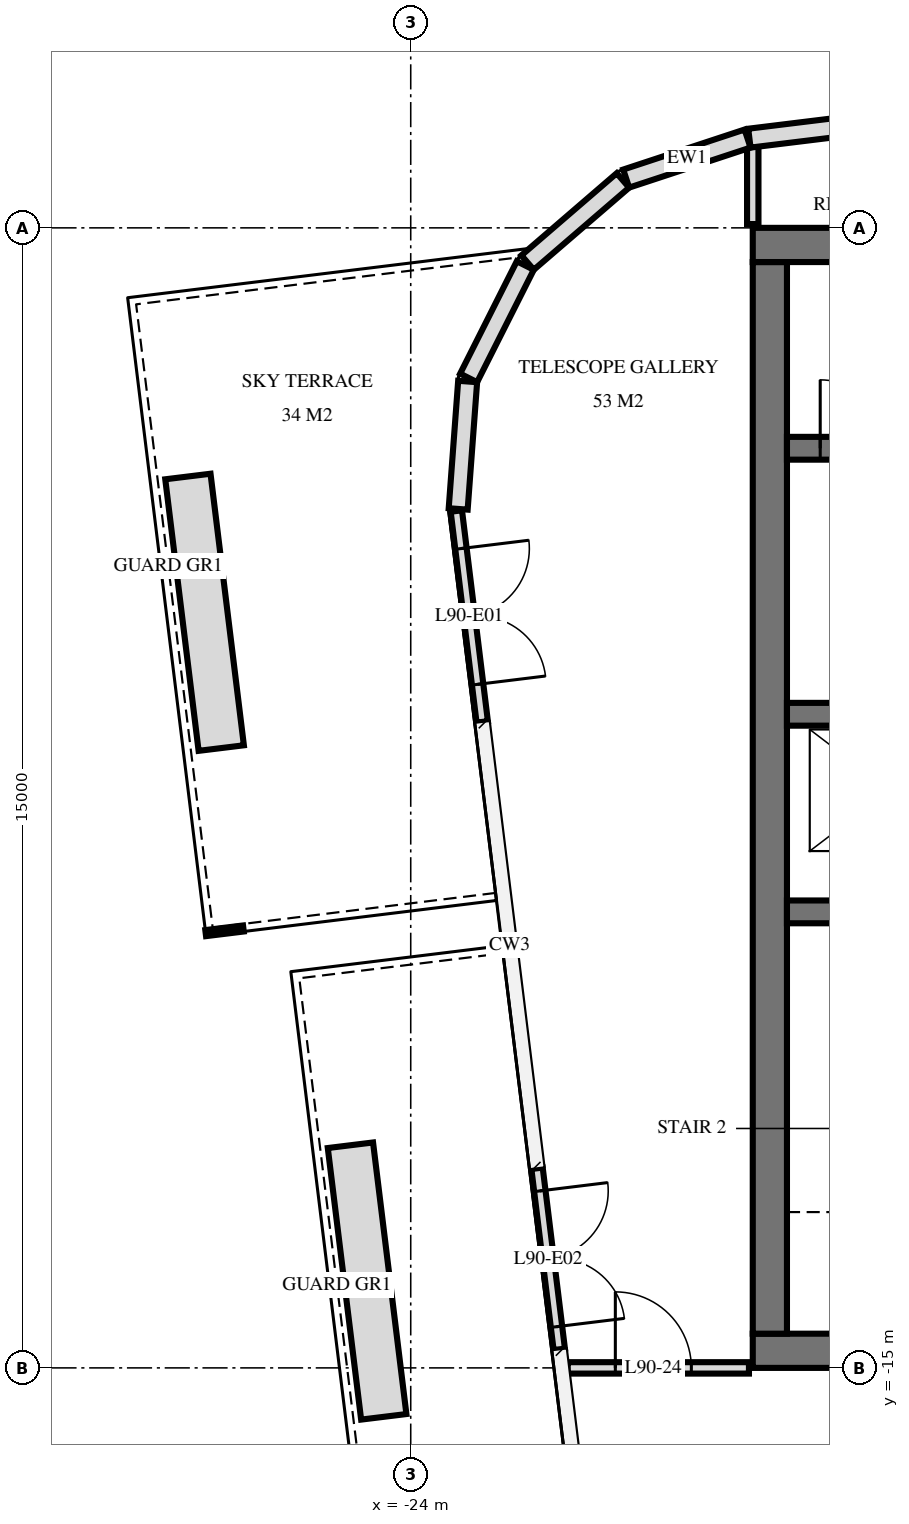
"""IFC4 building model, lengths in metres.
Left out: names, types, materials, properties, quantities, classifications, styles, units other than length and angle.
Written with IfcOpenShell. Run it as: python <this file> out.ifc"""

import sys

from ifc_helpers import new_model, si_unit, direction, frame, frame_2d, origin, place, context, subcontext, project, spatial, rectangle, extrude, element, fill, save


model = new_model("IFC4")
c1 = context("Model", 3, precision=1e-05, world=origin(), true_north=direction((0.0, 1.0)))
c2 = subcontext(c1, "Body", "Model", "MODEL_VIEW")
j1 = project(units=[si_unit("LENGTHUNIT", "METRE"), si_unit("PLANEANGLEUNIT", "RADIAN")], contexts=[c1])
p1 = place(None, origin())
s1 = spatial("IfcSite", under=j1, at=p1, CompositionType="ELEMENT")
p2 = place(p1, origin())
s2 = spatial("IfcBuilding", under=s1, at=p2, CompositionType="ELEMENT")
p3 = place(p2, frame((0.0, 0.0, 342.6)))
s3 = spatial("IfcBuildingStorey", under=s2, at=p3, CompositionType="ELEMENT", Elevation=342.6)
p4 = place(p3, frame((-19.5, -0.225, 0.0), z_axis=(0.0, 0.0, 1.0), x_axis=(1.0, 0.0, 0.0)))
e1 = element("IfcWall", 1, at=p4, inside=s3, PredefinedType="SHEAR", context=c2, shape_type="SweptSolid", body=[
    extrude(rectangle(XDim=9.5, YDim=0.45, at=frame_2d((4.75, 0.0))), origin(), (0.0, 0.0, 1.0), 4.0),
])
p5 = place(p3, frame((-19.5, -14.775, 0.0), z_axis=(0.0, 0.0, 1.0), x_axis=(1.0, 0.0, 0.0)))
e2 = element("IfcWall", 2, at=p5, inside=s3, PredefinedType="SHEAR", context=c2, shape_type="SweptSolid", body=[
    extrude(rectangle(XDim=9.5, YDim=0.45, at=frame_2d((4.75, 0.0))), origin(), (0.0, 0.0, 1.0), 4.0),
])
p6 = place(p5, frame((1.2, 0.0, 0.0)))
e3 = element("IfcOpeningElement", 3, at=p6, cuts=e2, PredefinedType="OPENING", context=c2, shape_type="SweptSolid", body=[
    extrude(rectangle(XDim=1.2, YDim=2.1, at=frame_2d((0.6, 1.05))), frame((0.0, 0.235, 0.0), z_axis=(0.0, -1.0, 0.0), x_axis=(1.0, 0.0, 0.0)), (0.0, 0.0, 1.0), 0.47),
])
p7 = place(p5, frame((4.25, 0.0, 0.0)))
e4 = element("IfcOpeningElement", 4, at=p7, cuts=e2, PredefinedType="OPENING", context=c2, shape_type="SweptSolid", body=[
    extrude(rectangle(XDim=1.1, YDim=2.1, at=frame_2d((0.55, 1.05))), frame((0.0, 0.235, 0.0), z_axis=(0.0, -1.0, 0.0), x_axis=(1.0, 0.0, 0.0)), (0.0, 0.0, 1.0), 0.47),
])
p8 = place(p3, frame((-19.275, -14.55, 0.0), z_axis=(0.0, 0.0, 1.0), x_axis=(0.0, 1.0, 0.0)))
e5 = element("IfcWall", 5, at=p8, inside=s3, PredefinedType="SHEAR", context=c2, shape_type="SweptSolid", body=[
    extrude(rectangle(XDim=14.1, YDim=0.45, at=frame_2d((7.05, 0.0))), origin(), (0.0, 0.0, 1.0), 4.0),
])
p9 = place(p3, frame((-19.05, -2.9, 0.0), z_axis=(0.0, 0.0, 1.0), x_axis=(1.0, 0.0, 0.0)))
e6 = element("IfcWall", 6, at=p9, inside=s3, PredefinedType="SHEAR", context=c2, shape_type="SweptSolid", body=[
    extrude(rectangle(XDim=8.7, YDim=0.3, at=frame_2d((4.35, 0.0))), origin(), (0.0, 0.0, 1.0), 4.0),
])
p10 = place(p9, frame((6.8, 0.0, 0.0)))
e7 = element("IfcOpeningElement", 7, at=p10, cuts=e6, PredefinedType="OPENING", context=c2, shape_type="SweptSolid", body=[
    extrude(rectangle(XDim=1.1, YDim=2.1, at=frame_2d((0.55, 1.05))), frame((0.0, 0.16, 0.0), z_axis=(0.0, -1.0, 0.0), x_axis=(1.0, 0.0, 0.0)), (0.0, 0.0, 1.0), 0.32),
])
p11 = place(p9, frame((3.8, 0.0, 0.0)))
e8 = element("IfcOpeningElement", 8, at=p11, cuts=e6, PredefinedType="OPENING", context=c2, shape_type="SweptSolid", body=[
    extrude(rectangle(XDim=1.1, YDim=2.1, at=frame_2d((0.55, 1.05))), frame((0.0, 0.16, 0.0), z_axis=(0.0, -1.0, 0.0), x_axis=(1.0, 0.0, 0.0)), (0.0, 0.0, 1.0), 0.32),
])
p12 = place(p9, frame((1.863, 0.0, 0.0)))
e9 = element("IfcOpeningElement", 9, at=p12, cuts=e6, PredefinedType="OPENING", context=c2, shape_type="SweptSolid", body=[
    extrude(rectangle(XDim=0.9, YDim=2.1, at=frame_2d((0.45, 1.05))), frame((0.0, 0.16, 0.0), z_axis=(0.0, -1.0, 0.0), x_axis=(1.0, 0.0, 0.0)), (0.0, 0.0, 1.0), 0.32),
])
p13 = place(p9, frame((0.438, 0.0, 0.0)))
e10 = element("IfcOpeningElement", 10, at=p13, cuts=e6, PredefinedType="OPENING", context=c2, shape_type="SweptSolid", body=[
    extrude(rectangle(XDim=0.9, YDim=2.1, at=frame_2d((0.45, 1.05))), frame((0.0, 0.16, 0.0), z_axis=(0.0, -1.0, 0.0), x_axis=(1.0, 0.0, 0.0)), (0.0, 0.0, 1.0), 0.32),
])
p14 = place(p3, frame((-19.05, -6.4, 0.0), z_axis=(0.0, 0.0, 1.0), x_axis=(1.0, 0.0, 0.0)))
e11 = element("IfcWall", 11, at=p14, inside=s3, PredefinedType="SHEAR", context=c2, shape_type="SweptSolid", body=[
    extrude(rectangle(XDim=8.7, YDim=0.3, at=frame_2d((4.35, 0.0))), origin(), (0.0, 0.0, 1.0), 4.0),
])
p15 = place(p14, frame((6.8, 0.0, 0.0)))
e12 = element("IfcOpeningElement", 12, at=p15, cuts=e11, PredefinedType="OPENING", context=c2, shape_type="SweptSolid", body=[
    extrude(rectangle(XDim=1.1, YDim=2.1, at=frame_2d((0.55, 1.05))), frame((0.0, 0.16, 0.0), z_axis=(0.0, -1.0, 0.0), x_axis=(1.0, 0.0, 0.0)), (0.0, 0.0, 1.0), 0.32),
])
p16 = place(p14, frame((0.8, 0.0, 0.0)))
e13 = element("IfcOpeningElement", 13, at=p16, cuts=e11, PredefinedType="OPENING", context=c2, shape_type="SweptSolid", body=[
    extrude(rectangle(XDim=1.1, YDim=2.1, at=frame_2d((0.55, 1.05))), frame((0.0, 0.16, 0.0), z_axis=(0.0, -1.0, 0.0), x_axis=(1.0, 0.0, 0.0)), (0.0, 0.0, 1.0), 0.32),
])
p17 = place(p3, frame((-19.05, -9.0, 0.0), z_axis=(0.0, 0.0, 1.0), x_axis=(1.0, 0.0, 0.0)))
e14 = element("IfcWall", 14, at=p17, inside=s3, PredefinedType="SHEAR", context=c2, shape_type="SweptSolid", body=[
    extrude(rectangle(XDim=8.7, YDim=0.3, at=frame_2d((4.35, 0.0))), origin(), (0.0, 0.0, 1.0), 4.0),
])
p18 = place(p17, frame((3.8, 0.0, 0.0)))
e15 = element("IfcOpeningElement", 15, at=p18, cuts=e14, PredefinedType="OPENING", context=c2, shape_type="SweptSolid", body=[
    extrude(rectangle(XDim=1.1, YDim=2.1, at=frame_2d((0.55, 1.05))), frame((0.0, 0.16, 0.0), z_axis=(0.0, -1.0, 0.0), x_axis=(1.0, 0.0, 0.0)), (0.0, 0.0, 1.0), 0.32),
])
p19 = place(p3, frame((16.138, 5.561, 0.0), z_axis=(0.0, 0.0, 1.0), x_axis=(-0.992546726876, -0.121864658405, 0.0)))
e16 = element("IfcWall", 16, at=p19, inside=s3, PredefinedType="SOLIDWALL", context=c2, shape_type="SweptSolid", body=[
    extrude(rectangle(XDim=35.951, YDim=0.25, at=frame_2d((17.975, 0.0))), origin(), (0.0, 0.0, 1.0), 3.72),
])
p20 = place(p3, frame((-19.568, 1.175, 0.0), z_axis=(0.0, 0.0, 1.0), x_axis=(-0.949694735798, -0.313177120489, 0.0)))
e17 = element("IfcWall", 17, at=p20, inside=s3, PredefinedType="SOLIDWALL", context=c2, shape_type="SweptSolid", body=[
    extrude(rectangle(XDim=1.681, YDim=0.25, at=frame_2d((0.841, 0.0))), origin(), (0.0, 0.0, 1.0), 3.72),
])
p21 = place(p3, frame((-21.208, 0.624, 0.0), z_axis=(0.0, 0.0, 1.0), x_axis=(-0.757568315466, -0.652755886531, 0.0)))
e18 = element("IfcWall", 18, at=p21, inside=s3, PredefinedType="SOLIDWALL", context=c2, shape_type="SweptSolid", body=[
    extrude(rectangle(XDim=1.656, YDim=0.25, at=frame_2d((0.828, 0.0))), origin(), (0.0, 0.0, 1.0), 3.72),
])
p22 = place(p3, frame((-22.493, -0.495, 0.0), z_axis=(0.0, 0.0, 1.0), x_axis=(-0.449982385812, -0.893037430604, 0.0)))
e19 = element("IfcWall", 19, at=p22, inside=s3, PredefinedType="SOLIDWALL", context=c2, shape_type="SweptSolid", body=[
    extrude(rectangle(XDim=1.656, YDim=0.25, at=frame_2d((0.828, 0.0))), origin(), (0.0, 0.0, 1.0), 3.72),
])
p23 = place(p3, frame((-23.251, -2.021, 0.0), z_axis=(0.0, 0.0, 1.0), x_axis=(-0.074053534713, -0.997254267475, 0.0)))
e20 = element("IfcWall", 20, at=p23, inside=s3, PredefinedType="SOLIDWALL", context=c2, shape_type="SweptSolid", body=[
    extrude(rectangle(XDim=1.681, YDim=0.25, at=frame_2d((0.841, 0.0))), origin(), (0.0, 0.0, 1.0), 3.72),
])
p24 = place(p3, frame((-23.4, -3.726, 0.0), z_axis=(0.0, 0.0, 1.0), x_axis=(0.121830924856, -0.992550868091, 0.0)))
e21 = element("IfcWall", 21, at=p24, inside=s3, PredefinedType="USERDEFINED", context=c2, shape_type="SweptSolid", body=[
    extrude(rectangle(XDim=2.795, YDim=0.15, at=frame_2d((1.398, 0.0))), origin(), (0.0, 0.0, 1.0), 3.72),
])
p25 = place(p24, frame((0.498, 0.0, 0.0)))
e22 = element("IfcOpeningElement", 22, at=p25, cuts=e21, PredefinedType="OPENING", context=c2, shape_type="SweptSolid", body=[
    extrude(rectangle(XDim=1.8, YDim=2.4, at=frame_2d((0.9, 1.2))), frame((0.0, 0.085, 0.0), z_axis=(0.0, -1.0, 0.0), x_axis=(1.0, 0.0, 0.0)), (0.0, 0.0, 1.0), 0.17),
])
p26 = place(p3, frame((-22.338, -12.374, 0.0), z_axis=(0.0, 0.0, 1.0), x_axis=(0.121868445399, -0.992546261902, 0.0)))
e23 = element("IfcWall", 23, at=p26, inside=s3, PredefinedType="USERDEFINED", context=c2, shape_type="SweptSolid", body=[
    extrude(rectangle(XDim=2.4, YDim=0.15, at=frame_2d((1.2, 0.0))), origin(), (0.0, 0.0, 1.0), 3.72),
])
p27 = place(p26, frame((0.3, 0.0, 0.0)))
e24 = element("IfcOpeningElement", 24, at=p27, cuts=e23, PredefinedType="OPENING", context=c2, shape_type="SweptSolid", body=[
    extrude(rectangle(XDim=1.8, YDim=2.4, at=frame_2d((0.9, 1.2))), frame((0.0, 0.085, 0.0), z_axis=(0.0, -1.0, 0.0), x_axis=(1.0, 0.0, 0.0)), (0.0, 0.0, 1.0), 0.17),
])
for number, where, z_axis, x_axis in (
    (25, (-24.355, -15.644, 0.0), (0.0, 0.0, 1.0), (-0.122, 0.993, 0.0)),
    (26, (-26.493, -6.845, 0.0), (0.0, 0.0, 1.0), (-0.122, 0.993, 0.0)),
):
    element("IfcWall", number, at=place(p3, frame(where, z_axis=z_axis, x_axis=x_axis)), inside=s3, PredefinedType="USERDEFINED", context=c2, shape_type="SweptSolid", body=[
        extrude(rectangle(XDim=3.6, YDim=0.6, at=frame_2d((1.8, 0.0))), origin(), (0.0, 0.0, 1.0), 0.65),
    ])
p28 = place(p3, frame((-19.5, 0.05, 0.0), z_axis=(0.0, 0.0, 1.0), x_axis=(0.0, 1.0, 0.0)))
e27 = element("IfcWall", 27, at=p28, inside=s3, PredefinedType="PARTITIONING", context=c2, shape_type="SweptSolid", body=[
    extrude(rectangle(XDim=1.08, YDim=0.15, at=frame_2d((0.54, 0.0))), origin(), (0.0, 0.0, 1.0), 3.72),
])
p29 = place(p3, frame((-21.935, -15.0, 0.0), z_axis=(0.0, 0.0, 1.0), x_axis=(1.0, 0.0, 0.0)))
e28 = element("IfcWall", 28, at=p29, inside=s3, PredefinedType="PARTITIONING", context=c2, shape_type="SweptSolid", body=[
    extrude(rectangle(XDim=2.385, YDim=0.15, at=frame_2d((1.192, 0.0))), origin(), (0.0, 0.0, 1.0), 3.72),
])
p30 = place(p29, frame((0.627, 0.0, 0.0)))
e29 = element("IfcOpeningElement", 29, at=p30, cuts=e28, PredefinedType="OPENING", context=c2, shape_type="SweptSolid", body=[
    extrude(rectangle(XDim=1.0, YDim=2.1, at=frame_2d((0.5, 1.05))), frame((0.0, 0.085, 0.0), z_axis=(0.0, -1.0, 0.0), x_axis=(1.0, 0.0, 0.0)), (0.0, 0.0, 1.0), 0.17),
])
p31 = place(p25, origin())
e30 = element("IfcDoor", 30, at=p31, inside=s3, OperationType="DOUBLE_DOOR_SINGLE_SWING", PredefinedType="DOOR", context=c2, shape_type="SweptSolid", body=[
    extrude(rectangle(XDim=1.8, YDim=2.4, at=frame_2d((0.9, 1.2))), frame((0.0, 0.025, 0.0), z_axis=(0.0, -1.0, 0.0), x_axis=(1.0, 0.0, 0.0)), (0.0, 0.0, 1.0), 0.05),
])
fill(e22, e30)
p32 = place(p27, origin())
e31 = element("IfcDoor", 31, at=p32, inside=s3, OperationType="DOUBLE_DOOR_SINGLE_SWING", PredefinedType="DOOR", context=c2, shape_type="SweptSolid", body=[
    extrude(rectangle(XDim=1.8, YDim=2.4, at=frame_2d((0.9, 1.2))), frame((0.0, 0.025, 0.0), z_axis=(0.0, -1.0, 0.0), x_axis=(1.0, 0.0, 0.0)), (0.0, 0.0, 1.0), 0.05),
])
fill(e24, e31)
p33 = place(p13, origin())
e32 = element("IfcDoor", 32, at=p33, inside=s3, OperationType="SINGLE_SWING_RIGHT", PredefinedType="DOOR", context=c2, shape_type="SweptSolid", body=[
    extrude(rectangle(XDim=0.9, YDim=2.1, at=frame_2d((0.45, 1.05))), frame((0.0, 0.025, 0.0), z_axis=(0.0, -1.0, 0.0), x_axis=(1.0, 0.0, 0.0)), (0.0, 0.0, 1.0), 0.05),
])
fill(e10, e32)
p34 = place(p30, origin())
e33 = element("IfcDoor", 33, at=p34, inside=s3, OperationType="SINGLE_SWING_RIGHT", PredefinedType="DOOR", context=c2, shape_type="SweptSolid", body=[
    extrude(rectangle(XDim=1.0, YDim=2.1, at=frame_2d((0.5, 1.05))), frame((0.0, 0.025, 0.0), z_axis=(0.0, -1.0, 0.0), x_axis=(1.0, 0.0, 0.0)), (0.0, 0.0, 1.0), 0.05),
])
fill(e29, e33)
save(model, sys.argv[1])
